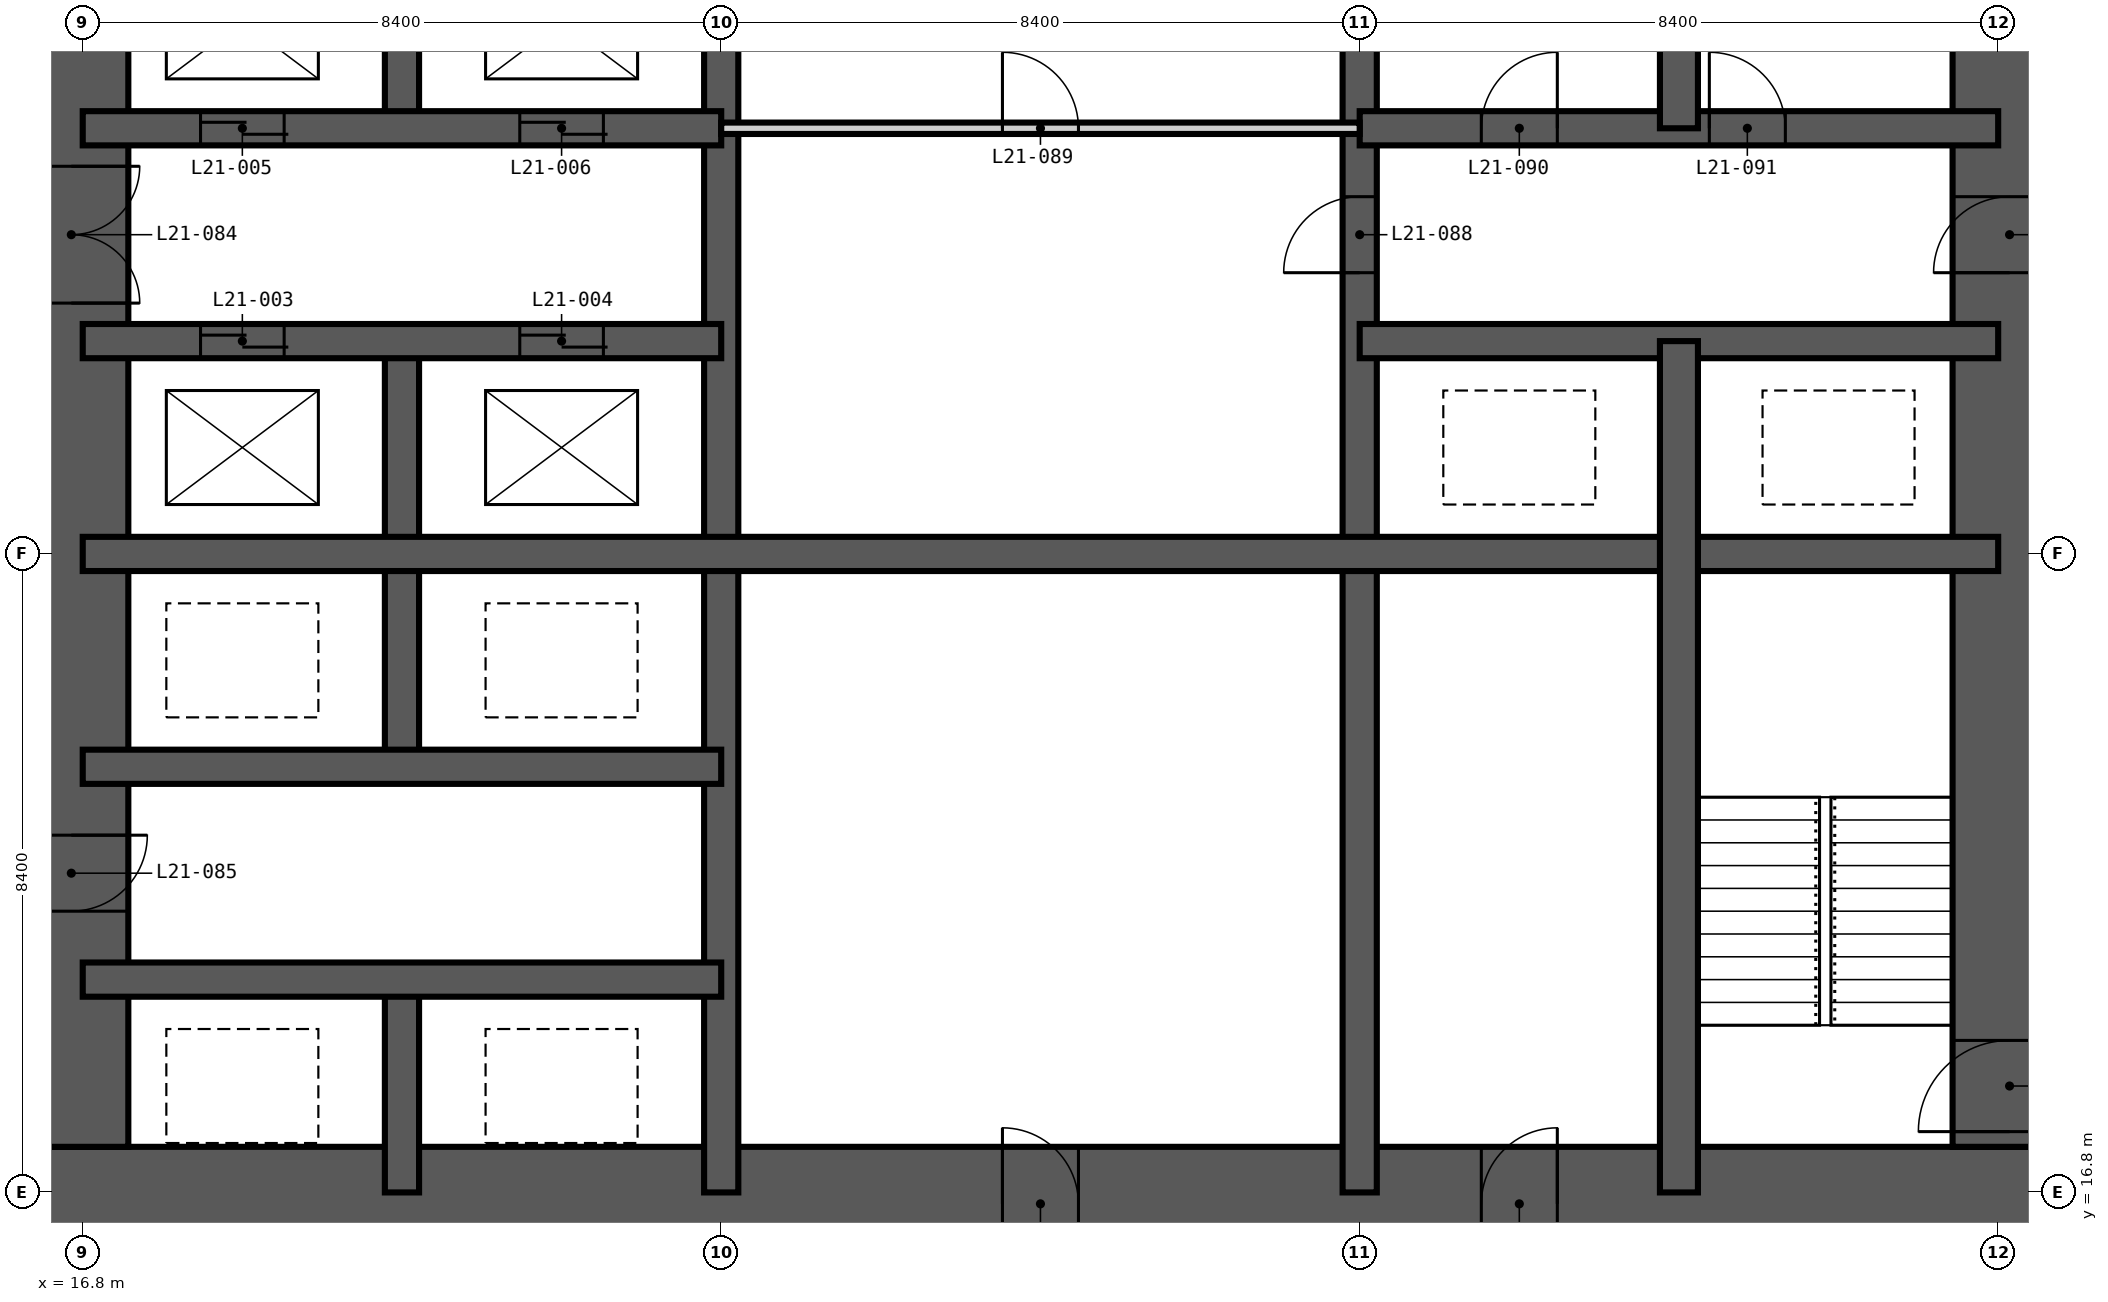
"""IFC4 building model, lengths in metres.
Left out: names, types, materials, properties, quantities, classifications, styles, units other than length and angle.
Written with IfcOpenShell. Run it as: python <this file> out.ifc"""

import sys

from ifc_helpers import new_model, si_unit, direction, frame, frame_2d, origin, place, context, subcontext, project, spatial, rectangle, extrude, element, fill, save


model = new_model("IFC4")
c1 = context("Model", 3, precision=1e-05, world=origin(), true_north=direction((0.0, 1.0)))
c2 = subcontext(c1, "Body", "Model", "MODEL_VIEW")
j1 = project(units=[si_unit("LENGTHUNIT", "METRE"), si_unit("PLANEANGLEUNIT", "RADIAN")], contexts=[c1])
p1 = place(None, origin())
s1 = spatial("IfcSite", under=j1, at=p1, CompositionType="ELEMENT")
p2 = place(p1, origin())
s2 = spatial("IfcBuilding", under=s1, at=p2, CompositionType="ELEMENT")
p3 = place(p2, frame((0.0, 0.0, 84.6)))
s3 = spatial("IfcBuildingStorey", under=s2, at=p3, CompositionType="ELEMENT", Elevation=84.6)
p4 = place(p3, frame((15.9, 16.65, -0.35), z_axis=(0.0, 0.0, 1.0), x_axis=(1.0, 0.0, 0.0)))
e1 = element("IfcWall", 1, at=p4, inside=s3, PredefinedType="SHEAR", context=c2, shape_type="SweptSolid", body=[
    extrude(rectangle(XDim=27.0, YDim=1.5, at=frame_2d((13.5, 0.0))), origin(), (0.0, 0.0, 1.0), 3.55),
])
p5 = place(p4, frame((13.0, 0.0, 0.35)))
e2 = element("IfcOpeningElement", 2, at=p5, cuts=e1, PredefinedType="OPENING", context=c2, shape_type="SweptSolid", body=[
    extrude(rectangle(XDim=1.0, YDim=2.1, at=frame_2d((0.5, 1.05))), frame((0.0, 0.76, 0.0), z_axis=(0.0, -1.0, 0.0), x_axis=(1.0, 0.0, 0.0)), (0.0, 0.0, 1.0), 1.52),
])
p6 = place(p4, frame((19.3, 0.0, 0.35)))
e3 = element("IfcOpeningElement", 3, at=p6, cuts=e1, PredefinedType="OPENING", context=c2, shape_type="SweptSolid", body=[
    extrude(rectangle(XDim=1.0, YDim=2.1, at=frame_2d((0.5, 1.05))), frame((0.0, 0.76, 0.0), z_axis=(0.0, -1.0, 0.0), x_axis=(1.0, 0.0, 0.0)), (0.0, 0.0, 1.0), 1.52),
])
p7 = place(p3, frame((42.15, 17.4, -0.35), z_axis=(0.0, 0.0, 1.0), x_axis=(0.0, 1.0, 0.0)))
e4 = element("IfcWall", 4, at=p7, inside=s3, PredefinedType="SHEAR", context=c2, shape_type="SweptSolid", body=[
    extrude(rectangle(XDim=24.0, YDim=1.5, at=frame_2d((12.0, 0.0))), origin(), (0.0, 0.0, 1.0), 3.55),
])
p8 = place(p7, frame((0.2, 0.0, 0.35)))
e5 = element("IfcOpeningElement", 5, at=p8, cuts=e4, PredefinedType="OPENING", context=c2, shape_type="SweptSolid", body=[
    extrude(rectangle(XDim=1.2, YDim=2.2, at=frame_2d((0.6, 1.1))), frame((0.0, 0.76, 0.0), z_axis=(0.0, -1.0, 0.0), x_axis=(1.0, 0.0, 0.0)), (0.0, 0.0, 1.0), 1.52),
])
p9 = place(p7, frame((11.5, 0.0, 0.35)))
e6 = element("IfcOpeningElement", 6, at=p9, cuts=e4, PredefinedType="OPENING", context=c2, shape_type="SweptSolid", body=[
    extrude(rectangle(XDim=1.0, YDim=2.1, at=frame_2d((0.5, 1.05))), frame((0.0, 0.76, 0.0), z_axis=(0.0, -1.0, 0.0), x_axis=(1.0, 0.0, 0.0)), (0.0, 0.0, 1.0), 1.52),
])
p10 = place(p7, frame((19.9, 0.0, 0.35)))
e7 = element("IfcOpeningElement", 7, at=p10, cuts=e4, PredefinedType="OPENING", context=c2, shape_type="SweptSolid", body=[
    extrude(rectangle(XDim=1.0, YDim=2.1, at=frame_2d((0.5, 1.05))), frame((0.0, 0.76, 0.0), z_axis=(0.0, -1.0, 0.0), x_axis=(1.0, 0.0, 0.0)), (0.0, 0.0, 1.0), 1.52),
])
p11 = place(p3, frame((16.65, 41.4, -0.35), z_axis=(0.0, 0.0, 1.0), x_axis=(0.0, -1.0, 0.0)))
e8 = element("IfcWall", 8, at=p11, inside=s3, PredefinedType="SHEAR", context=c2, shape_type="SweptSolid", body=[
    extrude(rectangle(XDim=24.0, YDim=1.5, at=frame_2d((12.0, 0.0))), origin(), (0.0, 0.0, 1.0), 3.55),
])
p12 = place(p11, frame((11.1, 0.0, 0.35)))
e9 = element("IfcOpeningElement", 9, at=p12, cuts=e8, PredefinedType="OPENING", context=c2, shape_type="SweptSolid", body=[
    extrude(rectangle(XDim=1.8, YDim=2.2, at=frame_2d((0.9, 1.1))), frame((0.0, 0.76, 0.0), z_axis=(0.0, -1.0, 0.0), x_axis=(1.0, 0.0, 0.0)), (0.0, 0.0, 1.0), 1.52),
])
p13 = place(p11, frame((19.9, 0.0, 0.35)))
e10 = element("IfcOpeningElement", 10, at=p13, cuts=e8, PredefinedType="OPENING", context=c2, shape_type="SweptSolid", body=[
    extrude(rectangle(XDim=1.0, YDim=2.1, at=frame_2d((0.5, 1.05))), frame((0.0, 0.76, 0.0), z_axis=(0.0, -1.0, 0.0), x_axis=(1.0, 0.0, 0.0)), (0.0, 0.0, 1.0), 1.52),
])
p14 = place(p11, frame((5.2, 0.0, 0.35)))
e11 = element("IfcOpeningElement", 11, at=p14, cuts=e8, PredefinedType="OPENING", context=c2, shape_type="SweptSolid", body=[
    extrude(rectangle(XDim=1.0, YDim=2.1, at=frame_2d((0.5, 1.05))), frame((0.0, 0.76, 0.0), z_axis=(0.0, -1.0, 0.0), x_axis=(1.0, 0.0, 0.0)), (0.0, 0.0, 1.0), 1.52),
])
p15 = place(p3, frame((21.0, 16.8, -0.35), z_axis=(0.0, 0.0, 1.0), x_axis=(0.0, 1.0, 0.0)))
e12 = element("IfcWall", 12, at=p15, inside=s3, PredefinedType="SHEAR", context=c2, shape_type="SweptSolid", body=[
    extrude(rectangle(XDim=2.8, YDim=0.45, at=frame_2d((1.4, 0.0))), origin(), (0.0, 0.0, 1.0), 3.55),
])
p16 = place(p3, frame((21.0, 22.4, -0.35), z_axis=(0.0, 0.0, 1.0), x_axis=(0.0, 1.0, 0.0)))
e13 = element("IfcWall", 13, at=p16, inside=s3, PredefinedType="SHEAR", context=c2, shape_type="SweptSolid", body=[
    extrude(rectangle(XDim=5.6, YDim=0.45, at=frame_2d((2.8, 0.0))), origin(), (0.0, 0.0, 1.0), 3.55),
])
p17 = place(p3, frame((21.0, 30.8, -0.35), z_axis=(0.0, 0.0, 1.0), x_axis=(0.0, 1.0, 0.0)))
e14 = element("IfcWall", 14, at=p17, inside=s3, PredefinedType="SHEAR", context=c2, shape_type="SweptSolid", body=[
    extrude(rectangle(XDim=2.8, YDim=0.45, at=frame_2d((1.4, 0.0))), origin(), (0.0, 0.0, 1.0), 3.55),
])
p18 = place(p3, frame((25.2, 16.8, -0.35), z_axis=(0.0, 0.0, 1.0), x_axis=(0.0, 1.0, 0.0)))
e15 = element("IfcWall", 15, at=p18, inside=s3, PredefinedType="SHEAR", context=c2, shape_type="SweptSolid", body=[
    extrude(rectangle(XDim=25.2, YDim=0.45, at=frame_2d((12.6, 0.0))), origin(), (0.0, 0.0, 1.0), 3.55),
])
p19 = place(p3, frame((33.6, 16.8, -0.35), z_axis=(0.0, 0.0, 1.0), x_axis=(0.0, 1.0, 0.0)))
e16 = element("IfcWall", 16, at=p19, inside=s3, PredefinedType="SHEAR", context=c2, shape_type="SweptSolid", body=[
    extrude(rectangle(XDim=25.2, YDim=0.45, at=frame_2d((12.6, 0.0))), origin(), (0.0, 0.0, 1.0), 3.55),
])
p20 = place(p19, frame((22.5, 0.0, 0.35)))
e17 = element("IfcOpeningElement", 17, at=p20, cuts=e16, PredefinedType="OPENING", context=c2, shape_type="SweptSolid", body=[
    extrude(rectangle(XDim=1.2, YDim=2.2, at=frame_2d((0.6, 1.1))), frame((0.0, 0.235, 0.0), z_axis=(0.0, -1.0, 0.0), x_axis=(1.0, 0.0, 0.0)), (0.0, 0.0, 1.0), 0.47),
])
p21 = place(p19, frame((18.3, 0.0, 0.35)))
e18 = element("IfcOpeningElement", 18, at=p21, cuts=e16, PredefinedType="OPENING", context=c2, shape_type="SweptSolid", body=[
    extrude(rectangle(XDim=1.2, YDim=2.2, at=frame_2d((0.6, 1.1))), frame((0.0, 0.235, 0.0), z_axis=(0.0, -1.0, 0.0), x_axis=(1.0, 0.0, 0.0)), (0.0, 0.0, 1.0), 0.47),
])
p22 = place(p19, frame((12.1, 0.0, 0.35)))
e19 = element("IfcOpeningElement", 19, at=p22, cuts=e16, PredefinedType="OPENING", context=c2, shape_type="SweptSolid", body=[
    extrude(rectangle(XDim=1.0, YDim=2.1, at=frame_2d((0.5, 1.05))), frame((0.0, 0.235, 0.0), z_axis=(0.0, -1.0, 0.0), x_axis=(1.0, 0.0, 0.0)), (0.0, 0.0, 1.0), 0.47),
])
for number, where, z_axis, x_axis in (
    (20, (16.8, 19.6, -0.35), (0.0, 0.0, 1.0), (1.0, 0.0, 0.0)),
    (21, (16.8, 22.4, -0.35), (0.0, 0.0, 1.0), (1.0, 0.0, 0.0)),
):
    element("IfcWall", number, at=place(p3, frame(where, z_axis=z_axis, x_axis=x_axis)), inside=s3, PredefinedType="SHEAR", context=c2, shape_type="SweptSolid", body=[
        extrude(rectangle(XDim=8.4, YDim=0.45, at=frame_2d((4.2, 0.0))), origin(), (0.0, 0.0, 1.0), 3.55),
    ])
p23 = place(p3, frame((16.8, 25.2, -0.35), z_axis=(0.0, 0.0, 1.0), x_axis=(1.0, 0.0, 0.0)))
e22 = element("IfcWall", 22, at=p23, inside=s3, PredefinedType="SHEAR", context=c2, shape_type="SweptSolid", body=[
    extrude(rectangle(XDim=25.2, YDim=0.45, at=frame_2d((12.6, 0.0))), origin(), (0.0, 0.0, 1.0), 3.55),
])
p24 = place(p3, frame((16.8, 28.0, -0.35), z_axis=(0.0, 0.0, 1.0), x_axis=(1.0, 0.0, 0.0)))
e23 = element("IfcWall", 23, at=p24, inside=s3, PredefinedType="SHEAR", context=c2, shape_type="SweptSolid", body=[
    extrude(rectangle(XDim=8.4, YDim=0.45, at=frame_2d((4.2, 0.0))), origin(), (0.0, 0.0, 1.0), 3.55),
])
p25 = place(p24, frame((1.55, 0.0, 0.35)))
e24 = element("IfcOpeningElement", 24, at=p25, cuts=e23, PredefinedType="OPENING", context=c2, shape_type="SweptSolid", body=[
    extrude(rectangle(XDim=1.1, YDim=2.2, at=frame_2d((0.55, 1.1))), frame((0.0, 0.235, 0.0), z_axis=(0.0, -1.0, 0.0), x_axis=(1.0, 0.0, 0.0)), (0.0, 0.0, 1.0), 0.47),
])
p26 = place(p24, frame((5.75, 0.0, 0.35)))
e25 = element("IfcOpeningElement", 25, at=p26, cuts=e23, PredefinedType="OPENING", context=c2, shape_type="SweptSolid", body=[
    extrude(rectangle(XDim=1.1, YDim=2.2, at=frame_2d((0.55, 1.1))), frame((0.0, 0.235, 0.0), z_axis=(0.0, -1.0, 0.0), x_axis=(1.0, 0.0, 0.0)), (0.0, 0.0, 1.0), 0.47),
])
p27 = place(p3, frame((33.6, 28.0, -0.35), z_axis=(0.0, 0.0, 1.0), x_axis=(1.0, 0.0, 0.0)))
e26 = element("IfcWall", 26, at=p27, inside=s3, PredefinedType="SHEAR", context=c2, shape_type="SweptSolid", body=[
    extrude(rectangle(XDim=8.4, YDim=0.45, at=frame_2d((4.2, 0.0))), origin(), (0.0, 0.0, 1.0), 3.55),
])
p28 = place(p3, frame((16.8, 30.8, -0.35), z_axis=(0.0, 0.0, 1.0), x_axis=(1.0, 0.0, 0.0)))
e27 = element("IfcWall", 27, at=p28, inside=s3, PredefinedType="SHEAR", context=c2, shape_type="SweptSolid", body=[
    extrude(rectangle(XDim=8.4, YDim=0.45, at=frame_2d((4.2, 0.0))), origin(), (0.0, 0.0, 1.0), 3.55),
])
p29 = place(p28, frame((1.55, 0.0, 0.35)))
e28 = element("IfcOpeningElement", 28, at=p29, cuts=e27, PredefinedType="OPENING", context=c2, shape_type="SweptSolid", body=[
    extrude(rectangle(XDim=1.1, YDim=2.2, at=frame_2d((0.55, 1.1))), frame((0.0, 0.235, 0.0), z_axis=(0.0, -1.0, 0.0), x_axis=(1.0, 0.0, 0.0)), (0.0, 0.0, 1.0), 0.47),
])
p30 = place(p28, frame((5.75, 0.0, 0.35)))
e29 = element("IfcOpeningElement", 29, at=p30, cuts=e27, PredefinedType="OPENING", context=c2, shape_type="SweptSolid", body=[
    extrude(rectangle(XDim=1.1, YDim=2.2, at=frame_2d((0.55, 1.1))), frame((0.0, 0.235, 0.0), z_axis=(0.0, -1.0, 0.0), x_axis=(1.0, 0.0, 0.0)), (0.0, 0.0, 1.0), 0.47),
])
p31 = place(p3, frame((33.6, 30.8, -0.35), z_axis=(0.0, 0.0, 1.0), x_axis=(1.0, 0.0, 0.0)))
e30 = element("IfcWall", 30, at=p31, inside=s3, PredefinedType="SHEAR", context=c2, shape_type="SweptSolid", body=[
    extrude(rectangle(XDim=8.4, YDim=0.45, at=frame_2d((4.2, 0.0))), origin(), (0.0, 0.0, 1.0), 3.55),
])
p32 = place(p31, frame((1.6, 0.0, 0.35)))
e31 = element("IfcOpeningElement", 31, at=p32, cuts=e30, PredefinedType="OPENING", context=c2, shape_type="SweptSolid", body=[
    extrude(rectangle(XDim=1.0, YDim=2.1, at=frame_2d((0.5, 1.05))), frame((0.0, 0.235, 0.0), z_axis=(0.0, -1.0, 0.0), x_axis=(1.0, 0.0, 0.0)), (0.0, 0.0, 1.0), 0.47),
])
p33 = place(p31, frame((4.6, 0.0, 0.35)))
e32 = element("IfcOpeningElement", 32, at=p33, cuts=e30, PredefinedType="OPENING", context=c2, shape_type="SweptSolid", body=[
    extrude(rectangle(XDim=1.0, YDim=2.1, at=frame_2d((0.5, 1.05))), frame((0.0, 0.235, 0.0), z_axis=(0.0, -1.0, 0.0), x_axis=(1.0, 0.0, 0.0)), (0.0, 0.0, 1.0), 0.47),
])
p34 = place(p3, frame((37.8, 16.8, -0.35), z_axis=(0.0, 0.0, 1.0), x_axis=(0.0, 1.0, 0.0)))
e33 = element("IfcWall", 33, at=p34, inside=s3, PredefinedType="SHEAR", context=c2, shape_type="SweptSolid", body=[
    extrude(rectangle(XDim=11.2, YDim=0.5, at=frame_2d((5.6, 0.0))), origin(), (0.0, 0.0, 1.0), 3.55),
])
p35 = place(p3, frame((37.8, 30.8, -0.35), z_axis=(0.0, 0.0, 1.0), x_axis=(0.0, 1.0, 0.0)))
e34 = element("IfcWall", 34, at=p35, inside=s3, PredefinedType="SHEAR", context=c2, shape_type="SweptSolid", body=[
    extrude(rectangle(XDim=2.8, YDim=0.5, at=frame_2d((1.4, 0.0))), origin(), (0.0, 0.0, 1.0), 3.55),
])
p36 = place(p3, frame((25.2, 30.8, 0.0), z_axis=(0.0, 0.0, 1.0), x_axis=(1.0, 0.0, 0.0)))
e35 = element("IfcWall", 35, at=p36, inside=s3, PredefinedType="PARTITIONING", context=c2, shape_type="SweptSolid", body=[
    extrude(rectangle(XDim=8.4, YDim=0.15, at=frame_2d((4.2, 0.0))), origin(), (0.0, 0.0, 1.0), 3.2),
])
p37 = place(p36, frame((3.7, 0.0, 0.0)))
e36 = element("IfcOpeningElement", 36, at=p37, cuts=e35, PredefinedType="OPENING", context=c2, shape_type="SweptSolid", body=[
    extrude(rectangle(XDim=1.0, YDim=2.1, at=frame_2d((0.5, 1.05))), frame((0.0, 0.085, 0.0), z_axis=(0.0, -1.0, 0.0), x_axis=(1.0, 0.0, 0.0)), (0.0, 0.0, 1.0), 0.17),
])
p38 = place(p8, origin())
e37 = element("IfcDoor", 37, at=p38, inside=s3, OperationType="SINGLE_SWING_LEFT", PredefinedType="DOOR", context=c2, shape_type="SweptSolid", body=[
    extrude(rectangle(XDim=1.2, YDim=2.2, at=frame_2d((0.6, 1.1))), frame((0.0, 0.025, 0.0), z_axis=(0.0, -1.0, 0.0), x_axis=(1.0, 0.0, 0.0)), (0.0, 0.0, 1.0), 0.05),
])
fill(e5, e37)
p39 = place(p25, origin())
e38 = element("IfcDoor", 38, at=p39, inside=s3, OperationType="DOUBLE_DOOR_SLIDING", PredefinedType="DOOR", context=c2, shape_type="SweptSolid", body=[
    extrude(rectangle(XDim=1.1, YDim=2.2, at=frame_2d((0.55, 1.1))), frame((0.0, 0.025, 0.0), z_axis=(0.0, -1.0, 0.0), x_axis=(1.0, 0.0, 0.0)), (0.0, 0.0, 1.0), 0.05),
])
fill(e24, e38)
p40 = place(p26, origin())
e39 = element("IfcDoor", 39, at=p40, inside=s3, OperationType="DOUBLE_DOOR_SLIDING", PredefinedType="DOOR", context=c2, shape_type="SweptSolid", body=[
    extrude(rectangle(XDim=1.1, YDim=2.2, at=frame_2d((0.55, 1.1))), frame((0.0, 0.025, 0.0), z_axis=(0.0, -1.0, 0.0), x_axis=(1.0, 0.0, 0.0)), (0.0, 0.0, 1.0), 0.05),
])
fill(e25, e39)
p41 = place(p29, origin())
e40 = element("IfcDoor", 40, at=p41, inside=s3, OperationType="DOUBLE_DOOR_SLIDING", PredefinedType="DOOR", context=c2, shape_type="SweptSolid", body=[
    extrude(rectangle(XDim=1.1, YDim=2.2, at=frame_2d((0.55, 1.1))), frame((0.0, 0.025, 0.0), z_axis=(0.0, -1.0, 0.0), x_axis=(1.0, 0.0, 0.0)), (0.0, 0.0, 1.0), 0.05),
])
fill(e28, e40)
p42 = place(p30, origin())
e41 = element("IfcDoor", 41, at=p42, inside=s3, OperationType="DOUBLE_DOOR_SLIDING", PredefinedType="DOOR", context=c2, shape_type="SweptSolid", body=[
    extrude(rectangle(XDim=1.1, YDim=2.2, at=frame_2d((0.55, 1.1))), frame((0.0, 0.025, 0.0), z_axis=(0.0, -1.0, 0.0), x_axis=(1.0, 0.0, 0.0)), (0.0, 0.0, 1.0), 0.05),
])
fill(e29, e41)
p43 = place(p12, origin())
e42 = element("IfcDoor", 42, at=p43, inside=s3, OperationType="DOUBLE_DOOR_DOUBLE_SWING", PredefinedType="DOOR", context=c2, shape_type="SweptSolid", body=[
    extrude(rectangle(XDim=1.8, YDim=2.2, at=frame_2d((0.9, 1.1))), frame((0.0, 0.025, 0.0), z_axis=(0.0, -1.0, 0.0), x_axis=(1.0, 0.0, 0.0)), (0.0, 0.0, 1.0), 0.05),
])
fill(e9, e42)
p44 = place(p13, origin())
e43 = element("IfcDoor", 43, at=p44, inside=s3, OperationType="SINGLE_SWING_LEFT", PredefinedType="DOOR", context=c2, shape_type="SweptSolid", body=[
    extrude(rectangle(XDim=1.0, YDim=2.1, at=frame_2d((0.5, 1.05))), frame((0.0, 0.025, 0.0), z_axis=(0.0, -1.0, 0.0), x_axis=(1.0, 0.0, 0.0)), (0.0, 0.0, 1.0), 0.05),
])
fill(e10, e43)
p45 = place(p22, origin())
e44 = element("IfcDoor", 44, at=p45, inside=s3, OperationType="SINGLE_SWING_LEFT", PredefinedType="DOOR", context=c2, shape_type="SweptSolid", body=[
    extrude(rectangle(XDim=1.0, YDim=2.1, at=frame_2d((0.5, 1.05))), frame((0.0, 0.025, 0.0), z_axis=(0.0, -1.0, 0.0), x_axis=(1.0, 0.0, 0.0)), (0.0, 0.0, 1.0), 0.05),
])
fill(e19, e44)
p46 = place(p37, origin())
e45 = element("IfcDoor", 45, at=p46, inside=s3, OperationType="SINGLE_SWING_LEFT", PredefinedType="DOOR", context=c2, shape_type="SweptSolid", body=[
    extrude(rectangle(XDim=1.0, YDim=2.1, at=frame_2d((0.5, 1.05))), frame((0.0, 0.025, 0.0), z_axis=(0.0, -1.0, 0.0), x_axis=(1.0, 0.0, 0.0)), (0.0, 0.0, 1.0), 0.05),
])
fill(e36, e45)
p47 = place(p32, origin())
e46 = element("IfcDoor", 46, at=p47, inside=s3, OperationType="SINGLE_SWING_RIGHT", PredefinedType="DOOR", context=c2, shape_type="SweptSolid", body=[
    extrude(rectangle(XDim=1.0, YDim=2.1, at=frame_2d((0.5, 1.05))), frame((0.0, 0.025, 0.0), z_axis=(0.0, -1.0, 0.0), x_axis=(1.0, 0.0, 0.0)), (0.0, 0.0, 1.0), 0.05),
])
fill(e31, e46)
p48 = place(p33, origin())
e47 = element("IfcDoor", 47, at=p48, inside=s3, OperationType="SINGLE_SWING_LEFT", PredefinedType="DOOR", context=c2, shape_type="SweptSolid", body=[
    extrude(rectangle(XDim=1.0, YDim=2.1, at=frame_2d((0.5, 1.05))), frame((0.0, 0.025, 0.0), z_axis=(0.0, -1.0, 0.0), x_axis=(1.0, 0.0, 0.0)), (0.0, 0.0, 1.0), 0.05),
])
fill(e32, e47)
p49 = place(p9, origin())
e48 = element("IfcDoor", 48, at=p49, inside=s3, OperationType="SINGLE_SWING_LEFT", PredefinedType="DOOR", context=c2, shape_type="SweptSolid", body=[
    extrude(rectangle(XDim=1.0, YDim=2.1, at=frame_2d((0.5, 1.05))), frame((0.0, 0.025, 0.0), z_axis=(0.0, -1.0, 0.0), x_axis=(1.0, 0.0, 0.0)), (0.0, 0.0, 1.0), 0.05),
])
fill(e6, e48)
p50 = place(p5, origin())
e49 = element("IfcDoor", 49, at=p50, inside=s3, OperationType="SINGLE_SWING_LEFT", PredefinedType="DOOR", context=c2, shape_type="SweptSolid", body=[
    extrude(rectangle(XDim=1.0, YDim=2.1, at=frame_2d((0.5, 1.05))), frame((0.0, 0.025, 0.0), z_axis=(0.0, -1.0, 0.0), x_axis=(1.0, 0.0, 0.0)), (0.0, 0.0, 1.0), 0.05),
])
fill(e2, e49)
p51 = place(p6, origin())
e50 = element("IfcDoor", 50, at=p51, inside=s3, OperationType="SINGLE_SWING_RIGHT", PredefinedType="DOOR", context=c2, shape_type="SweptSolid", body=[
    extrude(rectangle(XDim=1.0, YDim=2.1, at=frame_2d((0.5, 1.05))), frame((0.0, 0.025, 0.0), z_axis=(0.0, -1.0, 0.0), x_axis=(1.0, 0.0, 0.0)), (0.0, 0.0, 1.0), 0.05),
])
fill(e3, e50)
save(model, sys.argv[1])
